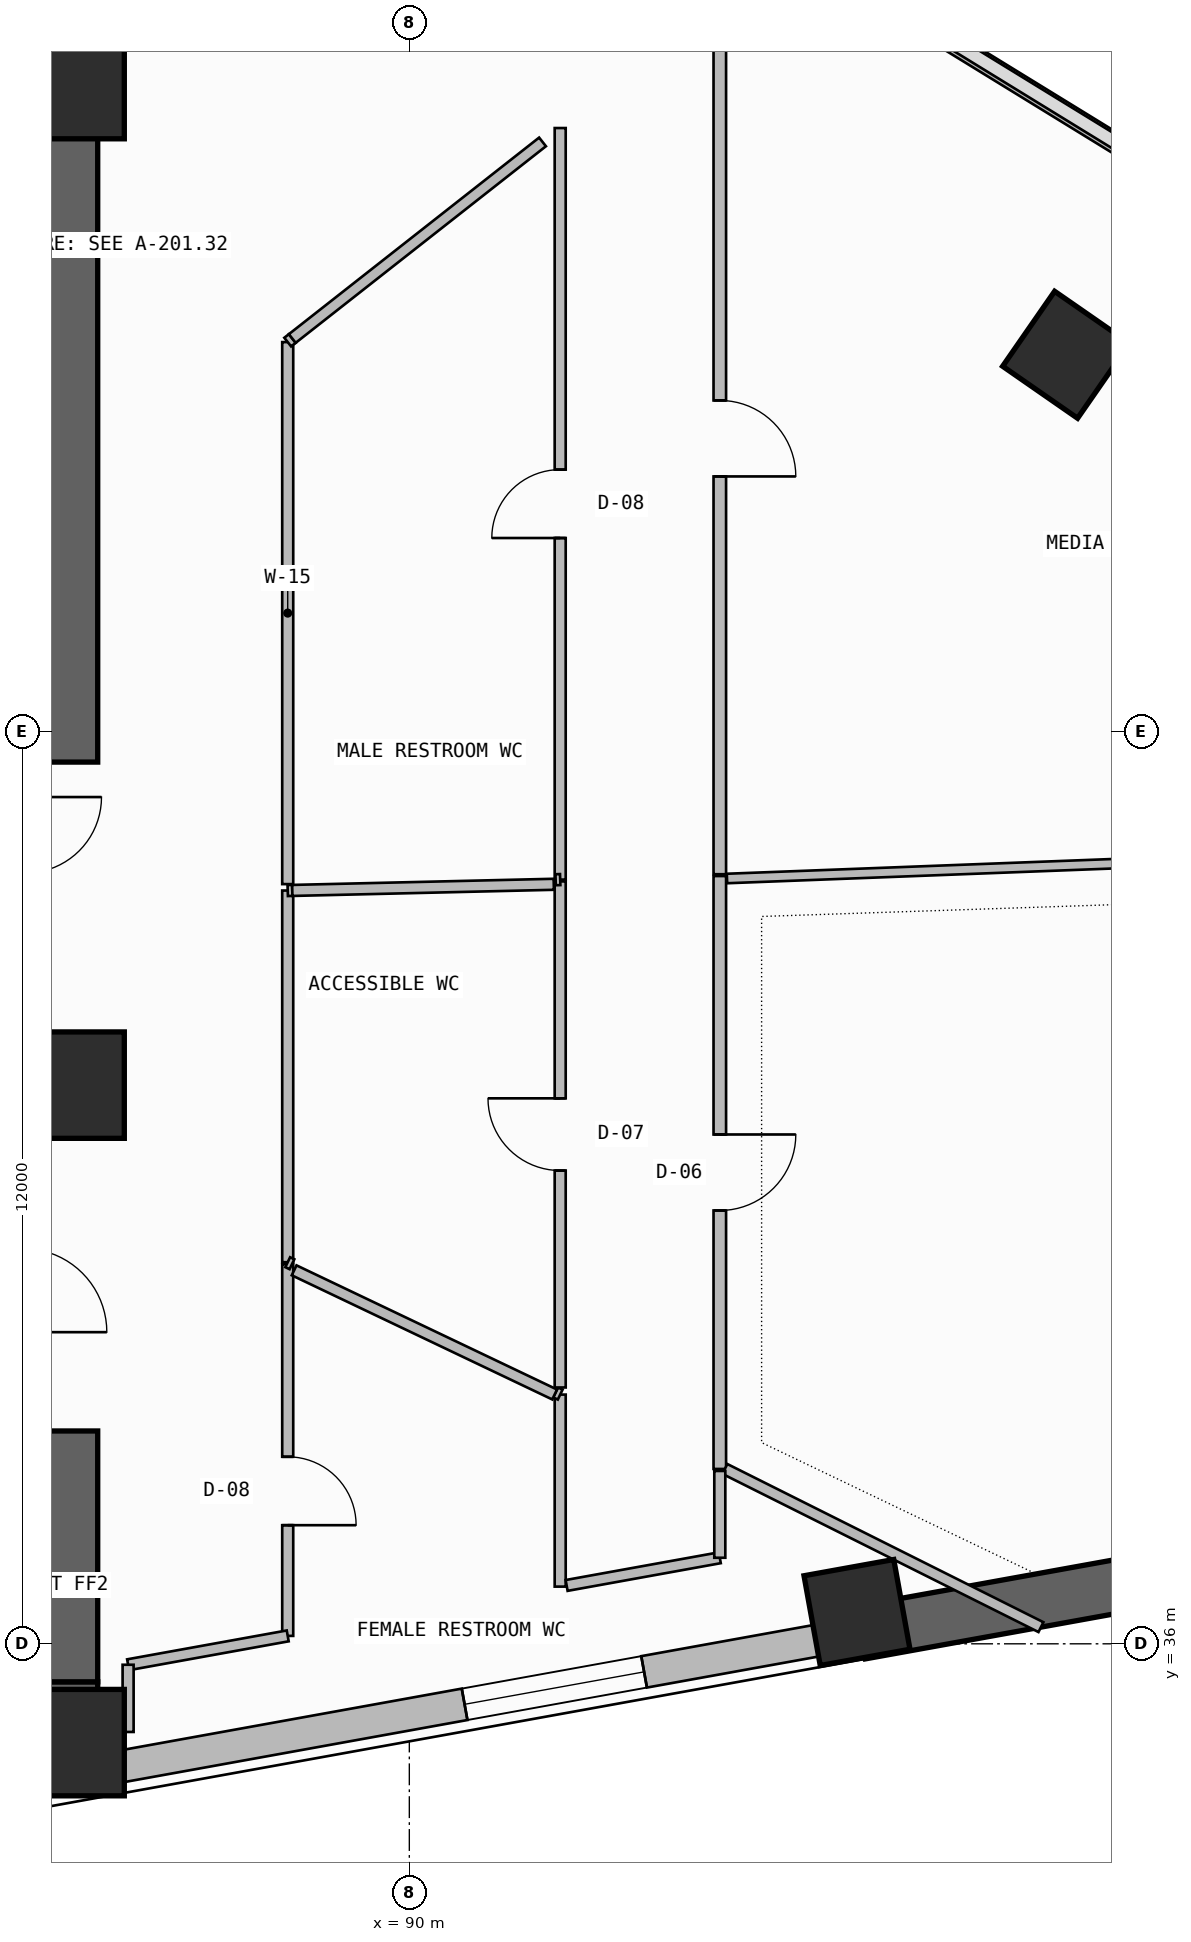
"""IFC4 building model, lengths in metres.
Left out: names, types, materials, properties, quantities, classifications, styles, units other than length and angle.
Written with IfcOpenShell. Run it as: python <this file> out.ifc"""

import sys

from ifc_helpers import new_model, si_unit, direction, frame, frame_2d, origin, origin_2d, place, context, subcontext, project, spatial, rectangle, extrude, element, fill, save


model = new_model("IFC4")
c1 = context("Model", 3, precision=1e-05, world=origin(), true_north=direction((0.0, 1.0)))
c2 = subcontext(c1, "Body", "Model", "MODEL_VIEW")
j1 = project(units=[si_unit("LENGTHUNIT", "METRE"), si_unit("PLANEANGLEUNIT", "RADIAN")], contexts=[c1])
p1 = place(None, origin())
s1 = spatial("IfcSite", under=j1, at=p1, CompositionType="ELEMENT")
p2 = place(p1, origin())
s2 = spatial("IfcBuilding", under=s1, at=p2, CompositionType="ELEMENT")
p3 = place(p2, frame((0.0, 0.0, 113.7)))
s3 = spatial("IfcBuildingStorey", under=s2, at=p3, CompositionType="ELEMENT", Elevation=113.7)
p4 = place(p3, frame((72.0, 35.05, -0.26), z_axis=(0.0, 0.0, 1.0), x_axis=(1.0, 0.0, 0.0)))
e1 = element("IfcWall", 1, at=p4, inside=s3, PredefinedType="SHEAR", context=c2, shape_type="SweptSolid", body=[
    extrude(rectangle(XDim=13.9, YDim=0.9, at=frame_2d((6.95, 0.0))), origin(), (0.0, 0.0, 1.0), 3.6),
])
p5 = place(p3, frame((85.45, 35.5, -0.26), z_axis=(0.0, 0.0, 1.0), x_axis=(0.0, 1.0, 0.0)))
e2 = element("IfcWall", 2, at=p5, inside=s3, PredefinedType="SHEAR", context=c2, shape_type="SweptSolid", body=[
    extrude(rectangle(XDim=3.3, YDim=0.9, at=frame_2d((1.65, 0.0))), origin(), (0.0, 0.0, 1.0), 3.6),
])
p6 = place(p3, frame((72.0, 56.5, -0.26), z_axis=(0.0, 0.0, 1.0), x_axis=(1.0, 0.0, 0.0)))
e3 = element("IfcWall", 3, at=p6, inside=s3, PredefinedType="SHEAR", context=c2, shape_type="SweptSolid", body=[
    extrude(rectangle(XDim=13.9, YDim=0.9, at=frame_2d((6.95, 0.0))), origin(), (0.0, 0.0, 1.0), 3.6),
])
p7 = place(p3, frame((85.45, 47.6, -0.26), z_axis=(0.0, 0.0, 1.0), x_axis=(0.0, 1.0, 0.0)))
e4 = element("IfcWall", 4, at=p7, inside=s3, PredefinedType="SHEAR", context=c2, shape_type="SweptSolid", body=[
    extrude(rectangle(XDim=8.45, YDim=0.9, at=frame_2d((4.225, 0.0))), origin(), (0.0, 0.0, 1.0), 3.6),
])
for number, where, z_axis, x_axis in (
    (5, (85.55, 34.7, 0.0), (0.0, 0.0, 1.0), (1.0, 0.0, 0.0)),
    (6, (85.55, 43.35, 0.0), (0.0, 0.0, 1.0), (1.0, 0.0, 0.0)),
    (7, (85.55, 56.5, 0.0), (0.0, 0.0, 1.0), (1.0, 0.0, 0.0)),
):
    element("IfcColumn", number, at=place(p3, frame(where, z_axis=z_axis, x_axis=x_axis)), inside=s3, PredefinedType="COLUMN", context=c2, shape_type="SweptSolid", body=[
        extrude(rectangle(XDim=1.4, YDim=1.4, at=origin_2d()), origin(), (0.0, 0.0, 1.0), 3.6),
    ])
for number, where, z_axis, x_axis in (
    (8, (95.89, 36.412, 0.0), (0.0, 0.0, 1.0), (0.984, 0.178, 0.0)),
    (9, (98.641, 52.958, 0.0), (0.0, 0.0, 1.0), (0.57, 0.822, 0.0)),
):
    element("IfcColumn", number, at=place(p3, frame(where, z_axis=z_axis, x_axis=x_axis)), inside=s3, PredefinedType="COLUMN", context=c2, shape_type="SweptSolid", body=[
        extrude(rectangle(XDim=1.2, YDim=1.2, at=origin_2d()), origin(), (0.0, 0.0, 1.0), 3.6),
    ])
p8 = place(p3, frame((86.1, 34.367, 0.0), z_axis=(0.0, 0.0, 1.0), x_axis=(0.9840437071, 0.177926902172, 0.0)))
e10 = element("IfcWall", 10, at=p8, inside=s3, PredefinedType="SOLIDWALL", context=c2, shape_type="SweptSolid", body=[
    extrude(rectangle(XDim=9.997, YDim=0.42, at=frame_2d((4.999, 0.0))), origin(), (0.0, 0.0, 1.0), 2.325),
])
p9 = place(p8, frame((4.702, 0.0, 1.2)))
e11 = element("IfcOpeningElement", 11, at=p9, cuts=e10, PredefinedType="OPENING", context=c2, shape_type="SweptSolid", body=[
    extrude(rectangle(XDim=2.4, YDim=0.9, at=frame_2d((1.2, 0.45))), frame((0.0, 0.22, 0.0), z_axis=(0.0, -1.0, 0.0), x_axis=(1.0, 0.0, 0.0)), (0.0, 0.0, 1.0), 0.44),
])
p10 = place(p3, frame((95.938, 36.146, -0.26), z_axis=(0.0, 0.0, 1.0), x_axis=(0.984038488288, 0.177955762952, 0.0)))
e12 = element("IfcWall", 12, at=p10, inside=s3, PredefinedType="SHEAR", context=c2, shape_type="SweptSolid", body=[
    extrude(rectangle(XDim=16.525, YDim=0.7, at=frame_2d((8.262, 0.0))), origin(), (0.0, 0.0, 1.0), 3.6),
])
p11 = place(p10, frame((11.2, 0.0, 1.2)))
e13 = element("IfcOpeningElement", 13, at=p11, cuts=e12, PredefinedType="OPENING", context=c2, shape_type="SweptSolid", body=[
    extrude(rectangle(XDim=2.4, YDim=0.9, at=frame_2d((1.2, 0.45))), frame((0.0, 0.36, 0.0), z_axis=(0.0, -1.0, 0.0), x_axis=(1.0, 0.0, 0.0)), (0.0, 0.0, 1.0), 0.72),
])
p12 = place(p3, frame((119.865, 43.07, 0.0), z_axis=(0.0, 0.0, 1.0), x_axis=(-0.852110824326, 0.52336138859, 0.0)))
e14 = element("IfcWall", 14, at=p12, inside=s3, PredefinedType="PARAPET", context=c2, shape_type="SweptSolid", body=[
    extrude(rectangle(XDim=33.932, YDim=0.2, at=frame_2d((16.966, 0.0))), origin(), (0.0, 0.0, 1.0), 1.15),
])
p13 = place(p3, frame((94.085, 38.301, 0.0), z_axis=(0.0, 0.0, 1.0), x_axis=(0.0, 1.0, 0.0)))
e15 = element("IfcWall", 15, at=p13, inside=s3, PredefinedType="PARTITIONING", context=c2, shape_type="SweptSolid", body=[
    extrude(rectangle(XDim=7.8, YDim=0.165, at=frame_2d((3.9, 0.0))), origin(), (0.0, 0.0, 1.0), 2.725),
])
p14 = place(p13, frame((3.4, 0.0, 0.0)))
e16 = element("IfcOpeningElement", 16, at=p14, cuts=e15, PredefinedType="OPENING", context=c2, shape_type="SweptSolid", body=[
    extrude(rectangle(XDim=1.0, YDim=2.2, at=frame_2d((0.5, 1.1))), frame((0.0, 0.093, 0.0), z_axis=(0.0, -1.0, 0.0), x_axis=(1.0, 0.0, 0.0)), (0.0, 0.0, 1.0), 0.185),
])
p15 = place(p3, frame((98.31, 36.219, 0.0), z_axis=(0.0, 0.0, 1.0), x_axis=(-0.89428014348, 0.447507569744, 0.0)))
e17 = element("IfcWall", 17, at=p15, inside=s3, PredefinedType="PARTITIONING", context=c2, shape_type="SweptSolid", body=[
    extrude(rectangle(XDim=4.65, YDim=0.145, at=frame_2d((2.325, 0.0))), origin(), (0.0, 0.0, 1.0), 2.325),
])
p16 = place(p3, frame((94.179, 46.069, 0.0), z_axis=(0.0, 0.0, 1.0), x_axis=(0.999269961217, 0.038203986822, 0.0)))
e18 = element("IfcWall", 18, at=p16, inside=s3, PredefinedType="PARTITIONING", context=c2, shape_type="SweptSolid", body=[
    extrude(rectangle(XDim=19.887, YDim=0.125, at=frame_2d((9.943, 0.0))), origin(), (0.0, 0.0, 1.0), 2.725),
])
p17 = place(p3, frame((88.4, 36.104, 0.0), z_axis=(0.0, 0.0, 1.0), x_axis=(0.0, 1.0, 0.0)))
e19 = element("IfcWall", 19, at=p17, inside=s3, PredefinedType="PARTITIONING", context=c2, shape_type="SweptSolid", body=[
    extrude(rectangle(XDim=4.89, YDim=0.145, at=frame_2d((2.445, 0.0))), origin(), (0.0, 0.0, 1.0), 3.34),
])
p18 = place(p17, frame((1.456, 0.0, 0.0)))
e20 = element("IfcOpeningElement", 20, at=p18, cuts=e19, PredefinedType="OPENING", context=c2, shape_type="SweptSolid", body=[
    extrude(rectangle(XDim=0.9, YDim=2.1, at=frame_2d((0.45, 1.05))), frame((0.0, 0.083, 0.0), z_axis=(0.0, -1.0, 0.0), x_axis=(1.0, 0.0, 0.0)), (0.0, 0.0, 1.0), 0.165),
])
p19 = place(p3, frame((91.985, 39.279, 0.0), z_axis=(0.0, 0.0, 1.0), x_axis=(0.0, -1.0, 0.0)))
e21 = element("IfcWall", 21, at=p19, inside=s3, PredefinedType="PARTITIONING", context=c2, shape_type="SweptSolid", body=[
    extrude(rectangle(XDim=2.526, YDim=0.145, at=frame_2d((1.263, 0.0))), origin(), (0.0, 0.0, 1.0), 2.875),
])
p20 = place(p3, frame((86.3, 35.724, 0.0), z_axis=(0.0, 0.0, 1.0), x_axis=(0.984046990905, 0.177908739781, 0.0)))
e22 = element("IfcWall", 22, at=p20, inside=s3, PredefinedType="PARTITIONING", context=c2, shape_type="SweptSolid", body=[
    extrude(rectangle(XDim=2.134, YDim=0.145, at=frame_2d((1.067, 0.0))), origin(), (0.0, 0.0, 1.0), 3.34),
])
p21 = place(p3, frame((92.07, 36.768, 0.0), z_axis=(0.0, 0.0, 1.0), x_axis=(0.984035419871, 0.177972729481, 0.0)))
e23 = element("IfcWall", 23, at=p21, inside=s3, PredefinedType="PARTITIONING", context=c2, shape_type="SweptSolid", body=[
    extrude(rectangle(XDim=2.048, YDim=0.145, at=frame_2d((1.024, 0.0))), origin(), (0.0, 0.0, 1.0), 3.34),
])
p22 = place(p3, frame((94.085, 37.132, 0.0), z_axis=(0.0, 0.0, 1.0), x_axis=(0.0, 1.0, 0.0)))
e24 = element("IfcWall", 24, at=p22, inside=s3, PredefinedType="PARTITIONING", context=c2, shape_type="SweptSolid", body=[
    extrude(rectangle(XDim=1.142, YDim=0.145, at=frame_2d((0.571, 0.0))), origin(), (0.0, 0.0, 1.0), 3.34),
])
p23 = place(p3, frame((91.925, 39.307, 0.0), z_axis=(0.0, 0.0, 1.0), x_axis=(0.901637414301, -0.432492743445, 0.0)))
e25 = element("IfcWall", 25, at=p23, inside=s3, PredefinedType="PARTITIONING", context=c2, shape_type="SweptSolid", body=[
    extrude(rectangle(XDim=0.067, YDim=0.145, at=frame_2d((0.033, 0.0))), origin(), (0.0, 0.0, 1.0), 3.34),
])
p24 = place(p3, frame((88.485, 40.914, 0.0), z_axis=(0.0, 0.0, 1.0), x_axis=(0.902716653577, -0.430235567283, 0.0)))
e26 = element("IfcWall", 26, at=p24, inside=s3, PredefinedType="PARTITIONING", context=c2, shape_type="SweptSolid", body=[
    extrude(rectangle(XDim=3.797, YDim=0.145, at=frame_2d((1.898, 0.0))), origin(), (0.0, 0.0, 1.0), 3.34),
])
p25 = place(p3, frame((91.985, 46.03, 0.0), z_axis=(0.0, 0.0, 1.0), x_axis=(0.0, -1.0, 0.0)))
e27 = element("IfcWall", 27, at=p25, inside=s3, PredefinedType="PARTITIONING", context=c2, shape_type="SweptSolid", body=[
    extrude(rectangle(XDim=6.658, YDim=0.145, at=frame_2d((3.329, 0.0))), origin(), (0.0, 0.0, 1.0), 2.725),
])
p26 = place(p25, frame((2.854, 0.0, 0.0)))
e28 = element("IfcOpeningElement", 28, at=p26, cuts=e27, PredefinedType="OPENING", context=c2, shape_type="SweptSolid", body=[
    extrude(rectangle(XDim=0.95, YDim=2.15, at=frame_2d((0.475, 1.075))), frame((0.0, 0.083, 0.0), z_axis=(0.0, -1.0, 0.0), x_axis=(1.0, 0.0, 0.0)), (0.0, 0.0, 1.0), 0.165),
])
p27 = place(p3, frame((88.4, 41.021, 0.0), z_axis=(0.0, 0.0, 1.0), x_axis=(0.0, 1.0, 0.0)))
e29 = element("IfcWall", 29, at=p27, inside=s3, PredefinedType="PARTITIONING", context=c2, shape_type="SweptSolid", body=[
    extrude(rectangle(XDim=4.89, YDim=0.145, at=frame_2d((2.445, 0.0))), origin(), (0.0, 0.0, 1.0), 2.725),
])
p28 = place(p3, frame((88.456, 40.994, 0.0), z_axis=(0.0, 0.0, 1.0), x_axis=(-0.902201175769, 0.431315474381, 0.0)))
e30 = element("IfcWall", 30, at=p28, inside=s3, PredefinedType="PARTITIONING", context=c2, shape_type="SweptSolid", body=[
    extrude(rectangle(XDim=0.062, YDim=0.145, at=frame_2d((0.031, 0.0))), origin(), (0.0, 0.0, 1.0), 3.34),
])
p29 = place(p3, frame((88.4, 45.91, 0.0), z_axis=(0.0, 0.0, 1.0), x_axis=(0.999471633277, 0.032503142546, 0.0)))
e31 = element("IfcWall", 31, at=p29, inside=s3, PredefinedType="PARTITIONING", context=c2, shape_type="SweptSolid", body=[
    extrude(rectangle(XDim=0.06, YDim=0.145, at=frame_2d((0.03, 0.0))), origin(), (0.0, 0.0, 1.0), 3.34),
])
p30 = place(p3, frame((88.46, 45.912, 0.0), z_axis=(0.0, 0.0, 1.0), x_axis=(0.999725922086, 0.023411123637, 0.0)))
e32 = element("IfcWall", 32, at=p30, inside=s3, PredefinedType="PARTITIONING", context=c2, shape_type="SweptSolid", body=[
    extrude(rectangle(XDim=3.441, YDim=0.145, at=frame_2d((1.721, 0.0))), origin(), (0.0, 0.0, 1.0), 3.34),
])
p31 = place(p3, frame((94.085, 46.125, 0.0), z_axis=(0.0, 0.0, 1.0), x_axis=(0.0, 1.0, 0.0)))
e33 = element("IfcWall", 33, at=p31, inside=s3, PredefinedType="PARTITIONING", context=c2, shape_type="SweptSolid", body=[
    extrude(rectangle(XDim=11.467, YDim=0.165, at=frame_2d((5.733, 0.0))), origin(), (0.0, 0.0, 1.0), 2.725),
])
p32 = place(p31, frame((5.233, 0.0, 0.0)))
e34 = element("IfcOpeningElement", 34, at=p32, cuts=e33, PredefinedType="OPENING", context=c2, shape_type="SweptSolid", body=[
    extrude(rectangle(XDim=1.0, YDim=2.2, at=frame_2d((0.5, 1.1))), frame((0.0, 0.093, 0.0), z_axis=(0.0, -1.0, 0.0), x_axis=(1.0, 0.0, 0.0)), (0.0, 0.0, 1.0), 0.185),
])
p33 = place(p3, frame((91.985, 55.942, 0.0), z_axis=(0.0, 0.0, 1.0), x_axis=(0.0, -1.0, 0.0)))
e35 = element("IfcWall", 35, at=p33, inside=s3, PredefinedType="PARTITIONING", context=c2, shape_type="SweptSolid", body=[
    extrude(rectangle(XDim=9.887, YDim=0.145, at=frame_2d((4.944, 0.0))), origin(), (0.0, 0.0, 1.0), 2.725),
])
p34 = place(p33, frame((4.494, 0.0, 0.0)))
e36 = element("IfcOpeningElement", 36, at=p34, cuts=e35, PredefinedType="OPENING", context=c2, shape_type="SweptSolid", body=[
    extrude(rectangle(XDim=0.9, YDim=2.1, at=frame_2d((0.45, 1.05))), frame((0.0, 0.083, 0.0), z_axis=(0.0, -1.0, 0.0), x_axis=(1.0, 0.0, 0.0)), (0.0, 0.0, 1.0), 0.165),
])
p35 = place(p3, frame((88.4, 45.995, 0.0), z_axis=(0.0, 0.0, 1.0), x_axis=(0.0, 1.0, 0.0)))
e37 = element("IfcWall", 37, at=p35, inside=s3, PredefinedType="PARTITIONING", context=c2, shape_type="SweptSolid", body=[
    extrude(rectangle(XDim=7.131, YDim=0.145, at=frame_2d((3.565, 0.0))), origin(), (0.0, 0.0, 1.0), 3.34),
])
p36 = place(p3, frame((88.4, 53.125, 0.0), z_axis=(0.0, 0.0, 1.0), x_axis=(0.785209472927, 0.619230234747, 0.0)))
e38 = element("IfcWall", 38, at=p36, inside=s3, PredefinedType="PARTITIONING", context=c2, shape_type="SweptSolid", body=[
    extrude(rectangle(XDim=0.076, YDim=0.145, at=frame_2d((0.038, 0.0))), origin(), (0.0, 0.0, 1.0), 3.34),
])
p37 = place(p3, frame((91.985, 46.054, 0.0), z_axis=(0.0, 0.0, 1.0), x_axis=(-0.999471633277, -0.032503142546, 0.0)))
e39 = element("IfcWall", 39, at=p37, inside=s3, PredefinedType="PARTITIONING", context=c2, shape_type="SweptSolid", body=[
    extrude(rectangle(XDim=0.06, YDim=0.145, at=frame_2d((0.03, 0.0))), origin(), (0.0, 0.0, 1.0), 3.34),
])
p38 = place(p3, frame((86.3, 34.84, 0.0), z_axis=(0.0, 0.0, 1.0), x_axis=(0.0, 1.0, 0.0)))
e40 = element("IfcWall", 40, at=p38, inside=s3, PredefinedType="PARTITIONING", context=c2, shape_type="SweptSolid", body=[
    extrude(rectangle(XDim=0.884, YDim=0.145, at=frame_2d((0.442, 0.0))), origin(), (0.0, 0.0, 1.0), 2.725),
])
p39 = place(p3, frame((88.46, 53.173, 0.0), z_axis=(0.0, 0.0, 1.0), x_axis=(0.786407363557, 0.617708230918, 0.0)))
e41 = element("IfcWall", 41, at=p39, inside=s3, PredefinedType="PARTITIONING", context=c2, shape_type="SweptSolid", body=[
    extrude(rectangle(XDim=4.187, YDim=0.145, at=frame_2d((2.093, 0.0))), origin(), (0.0, 0.0, 1.0), 2.725),
])
p40 = place(p9, origin())
e42 = element("IfcWindow", 42, at=p40, inside=s3, PartitioningType="SINGLE_PANEL", PredefinedType="WINDOW", context=c2, shape_type="SweptSolid", body=[
    extrude(rectangle(XDim=2.4, YDim=0.9, at=frame_2d((1.2, 0.45))), frame((0.0, 0.03, 0.0), z_axis=(0.0, -1.0, 0.0), x_axis=(1.0, 0.0, 0.0)), (0.0, 0.0, 1.0), 0.06),
])
fill(e11, e42)
p41 = place(p14, frame((1.0, 0.0, 0.0), z_axis=(0.0, 0.0, 1.0), x_axis=(-1.0, 0.0, 0.0)))
e43 = element("IfcDoor", 43, at=p41, inside=s3, OperationType="SINGLE_SWING_LEFT", PredefinedType="DOOR", context=c2, shape_type="SweptSolid", body=[
    extrude(rectangle(XDim=1.0, YDim=2.2, at=frame_2d((0.5, 1.1))), frame((0.0, 0.025, 0.0), z_axis=(0.0, -1.0, 0.0), x_axis=(1.0, 0.0, 0.0)), (0.0, 0.0, 1.0), 0.05),
])
fill(e16, e43)
p42 = place(p18, frame((0.9, 0.0, 0.0), z_axis=(0.0, 0.0, 1.0), x_axis=(-1.0, 0.0, 0.0)))
e44 = element("IfcDoor", 44, at=p42, inside=s3, OperationType="SINGLE_SWING_RIGHT", PredefinedType="DOOR", context=c2, shape_type="SweptSolid", body=[
    extrude(rectangle(XDim=0.9, YDim=2.1, at=frame_2d((0.45, 1.05))), frame((0.0, 0.025, 0.0), z_axis=(0.0, -1.0, 0.0), x_axis=(1.0, 0.0, 0.0)), (0.0, 0.0, 1.0), 0.05),
])
fill(e20, e44)
p43 = place(p26, frame((0.95, 0.0, 0.0), z_axis=(0.0, 0.0, 1.0), x_axis=(-1.0, 0.0, 0.0)))
e45 = element("IfcDoor", 45, at=p43, inside=s3, OperationType="SINGLE_SWING_RIGHT", PredefinedType="DOOR", context=c2, shape_type="SweptSolid", body=[
    extrude(rectangle(XDim=0.95, YDim=2.15, at=frame_2d((0.475, 1.075))), frame((0.0, 0.025, 0.0), z_axis=(0.0, -1.0, 0.0), x_axis=(1.0, 0.0, 0.0)), (0.0, 0.0, 1.0), 0.05),
])
fill(e28, e45)
p44 = place(p32, frame((1.0, 0.0, 0.0), z_axis=(0.0, 0.0, 1.0), x_axis=(-1.0, 0.0, 0.0)))
e46 = element("IfcDoor", 46, at=p44, inside=s3, OperationType="SINGLE_SWING_RIGHT", PredefinedType="DOOR", context=c2, shape_type="SweptSolid", body=[
    extrude(rectangle(XDim=1.0, YDim=2.2, at=frame_2d((0.5, 1.1))), frame((0.0, 0.025, 0.0), z_axis=(0.0, -1.0, 0.0), x_axis=(1.0, 0.0, 0.0)), (0.0, 0.0, 1.0), 0.05),
])
fill(e34, e46)
p45 = place(p34, frame((0.9, 0.0, 0.0), z_axis=(0.0, 0.0, 1.0), x_axis=(-1.0, 0.0, 0.0)))
e47 = element("IfcDoor", 47, at=p45, inside=s3, OperationType="SINGLE_SWING_LEFT", PredefinedType="DOOR", context=c2, shape_type="SweptSolid", body=[
    extrude(rectangle(XDim=0.9, YDim=2.1, at=frame_2d((0.45, 1.05))), frame((0.0, 0.025, 0.0), z_axis=(0.0, -1.0, 0.0), x_axis=(1.0, 0.0, 0.0)), (0.0, 0.0, 1.0), 0.05),
])
fill(e36, e47)
save(model, sys.argv[1])
